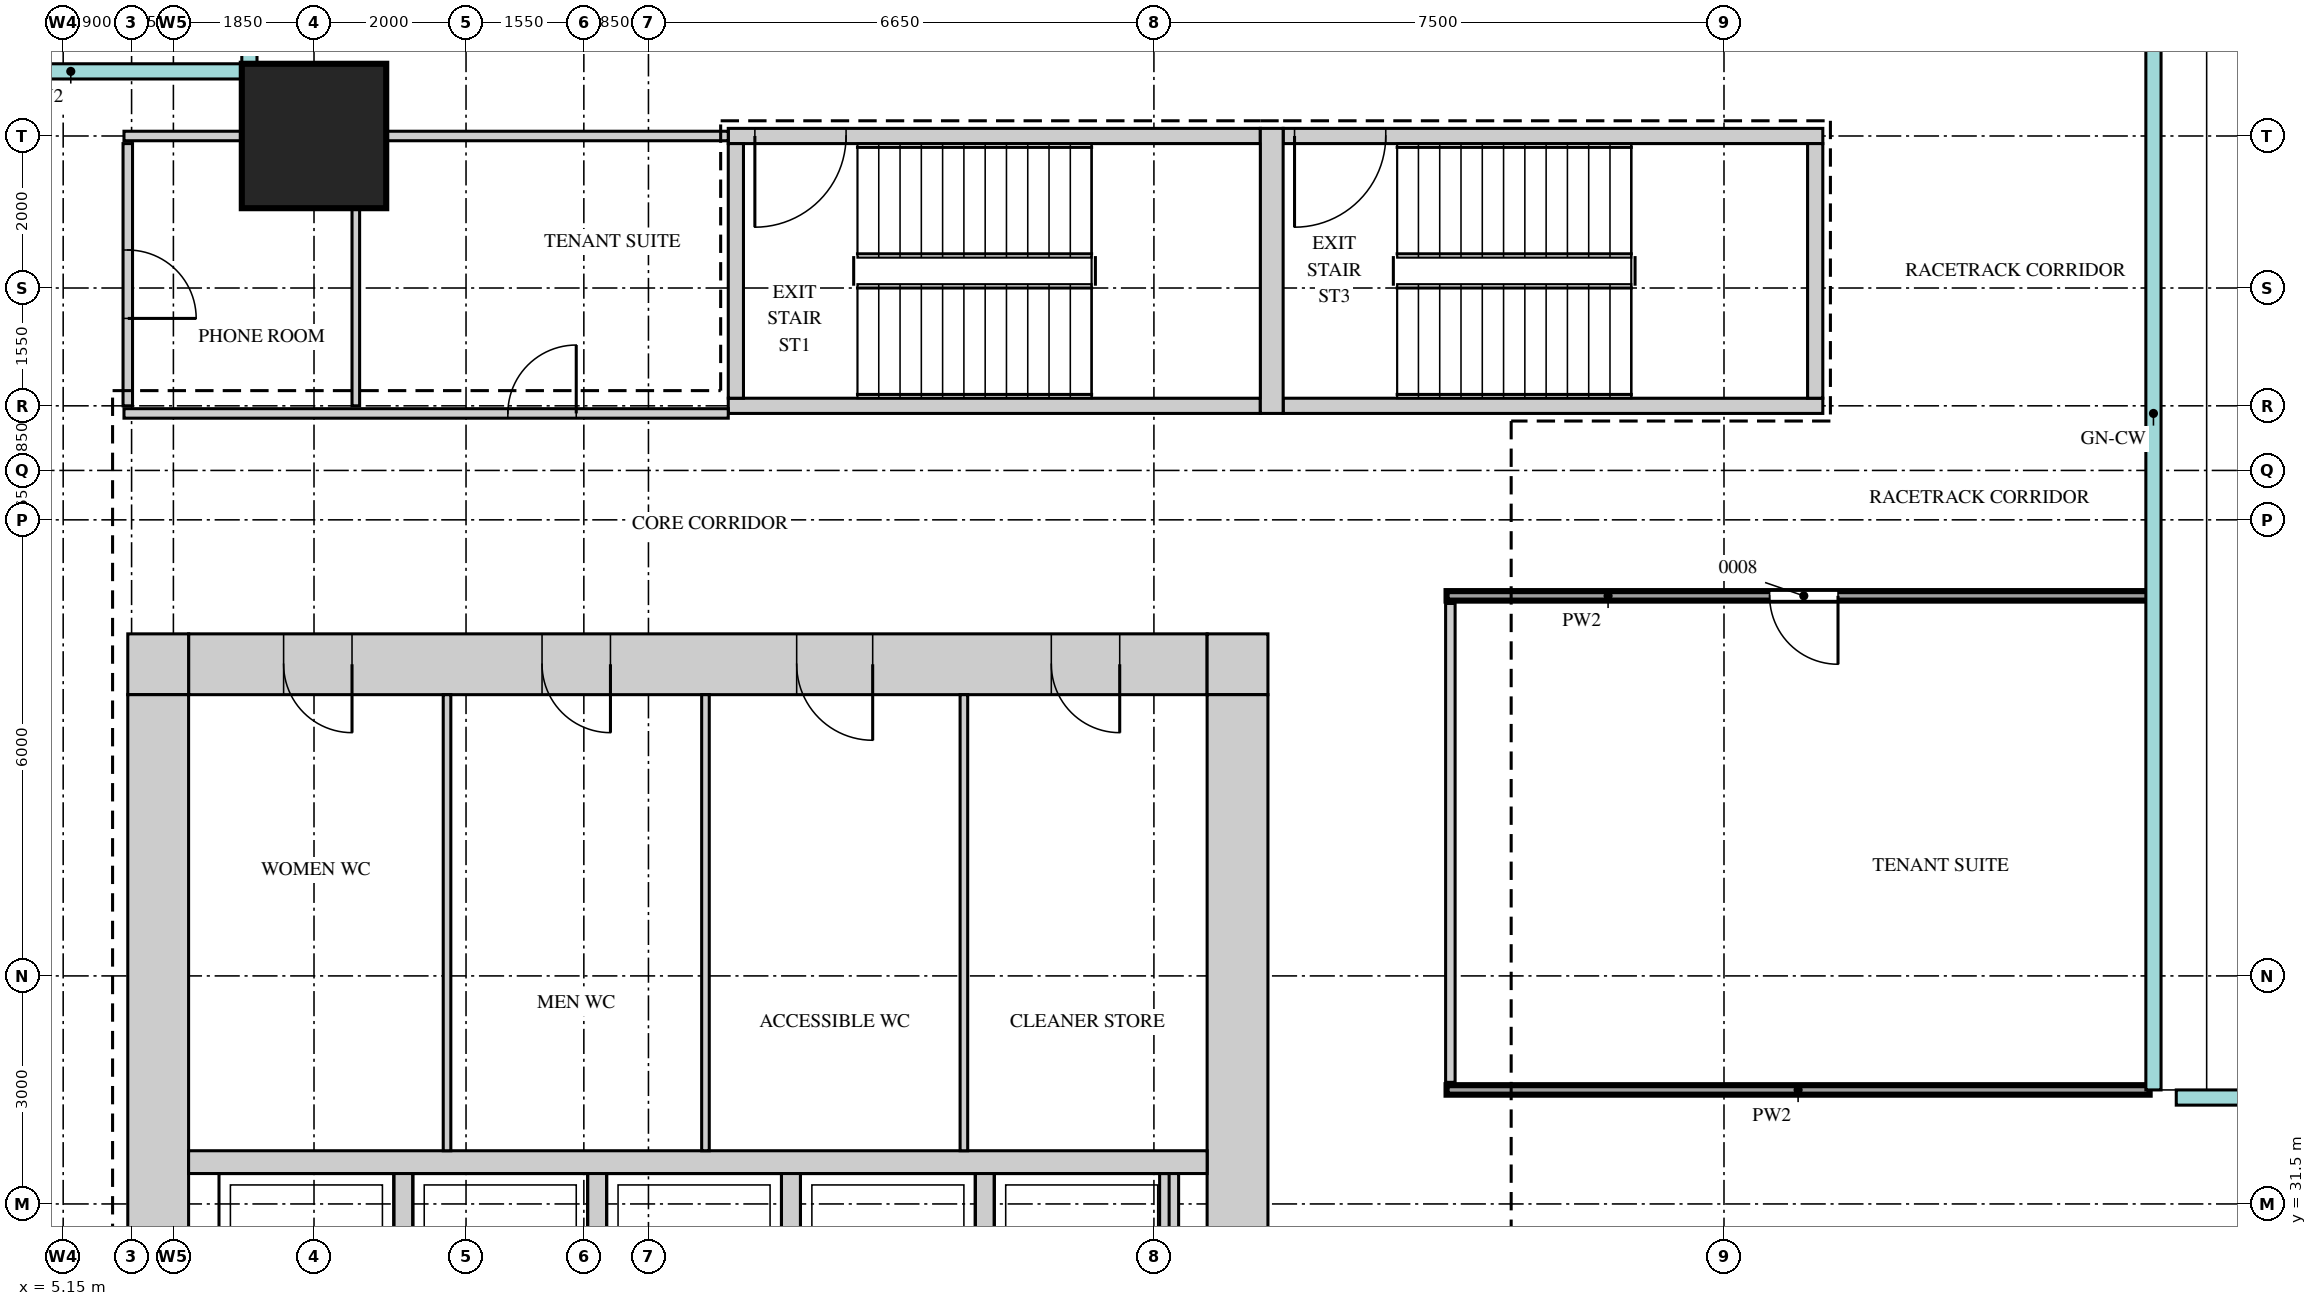
"""IFC4 building model, lengths in metres.
Left out: names, types, materials, properties, quantities, classifications, styles, units other than length and angle.
Written with IfcOpenShell. Run it as: python <this file> out.ifc"""

import sys

from ifc_helpers import new_model, si_unit, direction, frame, frame_2d, origin, origin_2d, place, context, subcontext, project, spatial, rectangle, extrude, source, transform, mapped, element, fill, save


model = new_model("IFC4")
c1 = context("Model", 3, precision=1e-05, world=origin(), true_north=direction((0.0, 1.0)))
c2 = subcontext(c1, "Body", "Model", "MODEL_VIEW")
j1 = project(units=[si_unit("LENGTHUNIT", "METRE"), si_unit("PLANEANGLEUNIT", "RADIAN")], contexts=[c1])
p1 = place(None, origin())
s1 = spatial("IfcSite", under=j1, at=p1, CompositionType="ELEMENT")
p2 = place(p1, origin())
s2 = spatial("IfcBuilding", under=s1, at=p2, CompositionType="ELEMENT")
p3 = place(p2, frame((0.0, 0.0, 176.7)))
s3 = spatial("IfcBuildingStorey", under=s2, at=p3, CompositionType="ELEMENT", Elevation=176.7)
m1 = source(origin(), c2, "Body", "SweptSolid", [
    extrude(rectangle(XDim=13.4, YDim=0.8, at=frame_2d((6.7, 0.0))), origin(), (0.0, 0.0, 1.0), 3.75),
])
p4 = place(p3, frame((6.8, 38.6, 0.0), z_axis=(0.0, 0.0, 1.0), x_axis=(1.0, 0.0, 0.0)))
e1 = element("IfcWall", 1, at=p4, inside=s3, PredefinedType="SHEAR", context=c2, shape_type="MappedRepresentation", body=[
    mapped(m1, transform((0.0, 0.0, 0.0))),
])
m2 = source(origin(), c2, "Body", "SweptSolid", [
    extrude(rectangle(XDim=0.9, YDim=2.1, at=frame_2d((0.45, 1.05))), frame((0.0, 0.41, 0.0), z_axis=(0.0, -1.0, 0.0), x_axis=(1.0, 0.0, 0.0)), (0.0, 0.0, 1.0), 0.82),
])
p5 = place(p4, frame((1.25, 0.0, 0.0)))
e2 = element("IfcOpeningElement", 2, at=p5, cuts=e1, PredefinedType="OPENING", context=c2, shape_type="MappedRepresentation", body=[
    mapped(m2, transform((0.0, 0.0, 0.0))),
])
p6 = place(p4, frame((4.65, 0.0, 0.0)))
e3 = element("IfcOpeningElement", 3, at=p6, cuts=e1, PredefinedType="OPENING", context=c2, shape_type="MappedRepresentation", body=[
    mapped(m2, transform((0.0, 0.0, 0.0))),
])
m3 = source(origin(), c2, "Body", "SweptSolid", [
    extrude(rectangle(XDim=1.0, YDim=2.1, at=frame_2d((0.5, 1.05))), frame((0.0, 0.41, 0.0), z_axis=(0.0, -1.0, 0.0), x_axis=(1.0, 0.0, 0.0)), (0.0, 0.0, 1.0), 0.82),
])
p7 = place(p4, frame((8.0, 0.0, 0.0)))
e4 = element("IfcOpeningElement", 4, at=p7, cuts=e1, PredefinedType="OPENING", context=c2, shape_type="MappedRepresentation", body=[
    mapped(m3, transform((0.0, 0.0, 0.0))),
])
p8 = place(p4, frame((11.35, 0.0, 0.0)))
e5 = element("IfcOpeningElement", 5, at=p8, cuts=e1, PredefinedType="OPENING", context=c2, shape_type="MappedRepresentation", body=[
    mapped(m2, transform((0.0, 0.0, 0.0))),
])
m4 = source(origin(), c2, "Body", "SweptSolid", [
    extrude(rectangle(XDim=0.8, YDim=0.8, at=frame_2d((0.4, 0.0))), origin(), (0.0, 0.0, 1.0), 3.75),
])
for number, where, z_axis, x_axis in (
    (6, (20.2, 38.6, 0.0), (0.0, 0.0, 1.0), (1.0, 0.0, 0.0)),
    (7, (6.0, 38.6, 0.0), (0.0, 0.0, 1.0), (1.0, 0.0, 0.0)),
):
    element("IfcWall", number, at=place(p3, frame(where, z_axis=z_axis, x_axis=x_axis)), inside=s3, PredefinedType="SHEAR", context=c2, shape_type="MappedRepresentation", body=[
        mapped(m4, transform((0.0, 0.0, 0.0))),
    ])
m5 = source(origin(), c2, "Body", "SweptSolid", [
    extrude(rectangle(XDim=22.4, YDim=0.8, at=frame_2d((11.2, 0.0))), origin(), (0.0, 0.0, 1.0), 3.75),
])
p9 = place(p3, frame((20.6, 15.8, 0.0), z_axis=(0.0, 0.0, 1.0), x_axis=(0.0, 1.0, 0.0)))
e8 = element("IfcWall", 8, at=p9, inside=s3, PredefinedType="SHEAR", context=c2, shape_type="MappedRepresentation", body=[
    mapped(m5, transform((0.0, 0.0, 0.0))),
])
m6 = source(origin(), c2, "Body", "SweptSolid", [
    extrude(rectangle(XDim=1.8, YDim=2.1, at=frame_2d((0.9, 1.05))), frame((0.0, 0.41, 0.0), z_axis=(0.0, -1.0, 0.0), x_axis=(1.0, 0.0, 0.0)), (0.0, 0.0, 1.0), 0.82),
])
p10 = place(p9, frame((10.7, 0.0, 0.0)))
e9 = element("IfcOpeningElement", 9, at=p10, cuts=e8, PredefinedType="OPENING", context=c2, shape_type="MappedRepresentation", body=[
    mapped(m6, transform((0.0, 0.0, 0.0))),
])
p11 = place(p9, frame((0.35, 0.0, 0.0)))
e10 = element("IfcOpeningElement", 10, at=p11, cuts=e8, PredefinedType="OPENING", context=c2, shape_type="MappedRepresentation", body=[
    mapped(m2, transform((0.0, 0.0, 0.0))),
])
p12 = place(p9, frame((3.9, 0.0, 0.0)))
e11 = element("IfcOpeningElement", 11, at=p12, cuts=e8, PredefinedType="OPENING", context=c2, shape_type="MappedRepresentation", body=[
    mapped(m2, transform((0.0, 0.0, 0.0))),
])
p13 = place(p3, frame((6.4, 15.8, 0.0), z_axis=(0.0, 0.0, 1.0), x_axis=(0.0, 1.0, 0.0)))
e12 = element("IfcWall", 12, at=p13, inside=s3, PredefinedType="SHEAR", context=c2, shape_type="MappedRepresentation", body=[
    mapped(m5, transform((0.0, 0.0, 0.0))),
])
m7 = source(origin(), c2, "Body", "SweptSolid", [
    extrude(rectangle(XDim=7.0, YDim=0.2, at=frame_2d((3.5, 0.0))), origin(), (0.0, 0.0, 1.0), 3.75),
])
p14 = place(p3, frame((13.9, 45.55, 0.0), z_axis=(0.0, 0.0, 1.0), x_axis=(1.0, 0.0, 0.0)))
e13 = element("IfcWall", 13, at=p14, inside=s3, PredefinedType="SHEAR", context=c2, shape_type="MappedRepresentation", body=[
    mapped(m7, transform((0.0, 0.0, 0.0))),
])
m8 = source(origin(), c2, "Body", "SweptSolid", [
    extrude(rectangle(XDim=1.2, YDim=2.1, at=frame_2d((0.6, 1.05))), frame((0.0, 0.11, 0.0), z_axis=(0.0, -1.0, 0.0), x_axis=(1.0, 0.0, 0.0)), (0.0, 0.0, 1.0), 0.22),
])
p15 = place(p14, frame((0.35, 0.0, 0.0)))
e14 = element("IfcOpeningElement", 14, at=p15, cuts=e13, PredefinedType="OPENING", context=c2, shape_type="MappedRepresentation", body=[
    mapped(m8, transform((0.0, 0.0, 0.0))),
])
p16 = place(p3, frame((13.9, 42.0, 0.0), z_axis=(0.0, 0.0, 1.0), x_axis=(1.0, 0.0, 0.0)))
e15 = element("IfcWall", 15, at=p16, inside=s3, PredefinedType="SHEAR", context=c2, shape_type="MappedRepresentation", body=[
    mapped(m7, transform((0.0, 0.0, 0.0))),
])
m9 = source(origin(), c2, "Body", "SweptSolid", [
    extrude(rectangle(XDim=7.1, YDim=0.2, at=frame_2d((3.55, 0.0))), origin(), (0.0, 0.0, 1.0), 3.75),
])
p17 = place(p3, frame((21.2, 45.55, 0.0), z_axis=(0.0, 0.0, 1.0), x_axis=(1.0, 0.0, 0.0)))
e16 = element("IfcWall", 16, at=p17, inside=s3, PredefinedType="SHEAR", context=c2, shape_type="MappedRepresentation", body=[
    mapped(m9, transform((0.0, 0.0, 0.0))),
])
p18 = place(p17, frame((0.15, 0.0, 0.0)))
e17 = element("IfcOpeningElement", 17, at=p18, cuts=e16, PredefinedType="OPENING", context=c2, shape_type="MappedRepresentation", body=[
    mapped(m8, transform((0.0, 0.0, 0.0))),
])
p19 = place(p3, frame((21.2, 42.0, 0.0), z_axis=(0.0, 0.0, 1.0), x_axis=(1.0, 0.0, 0.0)))
e18 = element("IfcWall", 18, at=p19, inside=s3, PredefinedType="SHEAR", context=c2, shape_type="MappedRepresentation", body=[
    mapped(m9, transform((0.0, 0.0, 0.0))),
])
m10 = source(origin(), c2, "Body", "SweptSolid", [
    extrude(rectangle(XDim=3.75, YDim=0.3, at=frame_2d((1.875, 0.0))), origin(), (0.0, 0.0, 1.0), 3.75),
])
p20 = place(p3, frame((21.05, 41.9, 0.0), z_axis=(0.0, 0.0, 1.0), x_axis=(0.0, 1.0, 0.0)))
e19 = element("IfcWall", 19, at=p20, inside=s3, PredefinedType="SHEAR", context=c2, shape_type="MappedRepresentation", body=[
    mapped(m10, transform((0.0, 0.0, 0.0))),
])
m11 = source(origin(), c2, "Body", "SweptSolid", [
    extrude(rectangle(XDim=3.35, YDim=0.2, at=frame_2d((1.675, 0.0))), origin(), (0.0, 0.0, 1.0), 3.75),
])
for number, where, z_axis, x_axis in (
    (20, (14.0, 42.1, 0.0), (0.0, 0.0, 1.0), (0.0, 1.0, 0.0)),
    (21, (28.2, 42.1, 0.0), (0.0, 0.0, 1.0), (0.0, 1.0, 0.0)),
):
    element("IfcWall", number, at=place(p3, frame(where, z_axis=z_axis, x_axis=x_axis)), inside=s3, PredefinedType="SHEAR", context=c2, shape_type="MappedRepresentation", body=[
        mapped(m11, transform((0.0, 0.0, 0.0))),
    ])
m12 = source(origin(), c2, "Body", "SweptSolid", [
    extrude(rectangle(XDim=13.4, YDim=0.3, at=frame_2d((6.7, 0.0))), origin(), (0.0, 0.0, 1.0), 3.75),
])
p21 = place(p3, frame((6.8, 32.05, 0.0), z_axis=(0.0, 0.0, 1.0), x_axis=(1.0, 0.0, 0.0)))
e22 = element("IfcWall", 22, at=p21, inside=s3, PredefinedType="STANDARD", context=c2, shape_type="MappedRepresentation", body=[
    mapped(m12, transform((0.0, 0.0, 0.0))),
])
m13 = source(origin(), c2, "Body", "SweptSolid", [
    extrude(rectangle(XDim=2.4, YDim=0.25, at=frame_2d((1.2, 0.0))), origin(), (0.0, 0.0, 1.0), 3.75),
])
for number, where, z_axis, x_axis in (
    (23, (17.275, 29.5, 0.0), (0.0, 0.0, 1.0), (0.0, 1.0, 0.0)),
    (24, (19.7, 29.5, 0.0), (0.0, 0.0, 1.0), (0.0, 1.0, 0.0)),
    (25, (9.625, 29.5, 0.0), (0.0, 0.0, 1.0), (0.0, 1.0, 0.0)),
    (26, (12.175, 29.5, 0.0), (0.0, 0.0, 1.0), (0.0, 1.0, 0.0)),
    (27, (14.725, 29.5, 0.0), (0.0, 0.0, 1.0), (0.0, 1.0, 0.0)),
):
    element("IfcWall", number, at=place(p3, frame(where, z_axis=z_axis, x_axis=x_axis)), inside=s3, PredefinedType="STANDARD", context=c2, shape_type="MappedRepresentation", body=[
        mapped(m13, transform((0.0, 0.0, 0.0))),
    ])
m14 = source(origin(), c2, "Body", "SweptSolid", [
    extrude(rectangle(XDim=1.9, YDim=1.9, at=origin_2d()), origin(), (0.0, 0.0, 1.0), 4.0),
])
p22 = place(p3, frame((8.45, 45.55, 0.0), z_axis=(0.0, 0.0, 1.0), x_axis=(1.0, 0.0, 0.0)))
e28 = element("IfcColumn", 28, at=p22, inside=s3, PredefinedType="COLUMN", context=c2, shape_type="MappedRepresentation", body=[
    mapped(m14, transform((0.0, 0.0, 0.0))),
])
m15 = source(origin(), c2, "Body", "SweptSolid", [
    extrude(rectangle(XDim=6.0, YDim=0.1, at=frame_2d((3.0, 0.0))), origin(), (0.0, 0.0, 1.0), 3.8),
])
for number, where, z_axis, x_axis in (
    (29, (10.2, 32.2, 0.0), (0.0, 0.0, 1.0), (0.0, 1.0, 0.0)),
    (30, (13.6, 32.2, 0.0), (0.0, 0.0, 1.0), (0.0, 1.0, 0.0)),
    (31, (17.0, 32.2, 0.0), (0.0, 0.0, 1.0), (0.0, 1.0, 0.0)),
):
    element("IfcWall", number, at=place(p3, frame(where, z_axis=z_axis, x_axis=x_axis)), inside=s3, PredefinedType="PARTITIONING", context=c2, shape_type="MappedRepresentation", body=[
        mapped(m15, transform((0.0, 0.0, 0.0))),
    ])
m16 = source(origin(), c2, "Body", "SweptSolid", [
    extrude(rectangle(XDim=9.25, YDim=0.125, at=frame_2d((4.625, 0.0))), origin(), (0.0, 0.0, 1.0), 3.8),
])
p23 = place(p3, frame((23.35, 33.0, 0.0), z_axis=(0.0, 0.0, 1.0), x_axis=(1.0, 0.0, 0.0)))
e32 = element("IfcWall", 32, at=p23, inside=s3, PredefinedType="PARTITIONING", context=c2, shape_type="MappedRepresentation", body=[
    mapped(m16, transform((0.0, 0.0, 0.0))),
])
m17 = source(origin(), c2, "Body", "SweptSolid", [
    extrude(rectangle(XDim=6.3, YDim=0.125, at=frame_2d((3.15, 0.0))), origin(), (0.0, 0.0, 1.0), 3.8),
])
p24 = place(p3, frame((23.4, 33.1, 0.0), z_axis=(0.0, 0.0, 1.0), x_axis=(0.0, 1.0, 0.0)))
e33 = element("IfcWall", 33, at=p24, inside=s3, PredefinedType="PARTITIONING", context=c2, shape_type="MappedRepresentation", body=[
    mapped(m17, transform((0.0, 0.0, 0.0))),
])
p25 = place(p3, frame((23.35, 39.5, 0.0), z_axis=(0.0, 0.0, 1.0), x_axis=(1.0, 0.0, 0.0)))
e34 = element("IfcWall", 34, at=p25, inside=s3, PredefinedType="PARTITIONING", context=c2, shape_type="MappedRepresentation", body=[
    mapped(m16, transform((0.0, 0.0, 0.0))),
])
m18 = source(origin(), c2, "Body", "SweptSolid", [
    extrude(rectangle(XDim=0.9, YDim=2.1, at=frame_2d((0.45, 1.05))), frame((0.0, 0.073, 0.0), z_axis=(0.0, -1.0, 0.0), x_axis=(1.0, 0.0, 0.0)), (0.0, 0.0, 1.0), 0.145),
])
p26 = place(p25, frame((4.25, 0.0, 0.0)))
e35 = element("IfcOpeningElement", 35, at=p26, cuts=e34, PredefinedType="OPENING", context=c2, shape_type="MappedRepresentation", body=[
    mapped(m18, transform((0.0, 0.0, 0.0))),
])
m19 = source(origin(), c2, "Body", "SweptSolid", [
    extrude(rectangle(XDim=7.95, YDim=0.125, at=frame_2d((3.975, 0.0))), origin(), (0.0, 0.0, 1.0), 3.8),
])
p27 = place(p3, frame((5.95, 41.9, 0.0), z_axis=(0.0, 0.0, 1.0), x_axis=(1.0, 0.0, 0.0)))
e36 = element("IfcWall", 36, at=p27, inside=s3, PredefinedType="PARTITIONING", context=c2, shape_type="MappedRepresentation", body=[
    mapped(m19, transform((0.0, 0.0, 0.0))),
])
p28 = place(p27, frame((5.05, 0.0, 0.0)))
e37 = element("IfcOpeningElement", 37, at=p28, cuts=e36, PredefinedType="OPENING", context=c2, shape_type="MappedRepresentation", body=[
    mapped(m18, transform((0.0, 0.0, 0.0))),
])
m20 = source(origin(), c2, "Body", "SweptSolid", [
    extrude(rectangle(XDim=3.45, YDim=0.125, at=frame_2d((1.725, 0.0))), origin(), (0.0, 0.0, 1.0), 3.8),
])
p29 = place(p3, frame((6.0, 42.0, 0.0), z_axis=(0.0, 0.0, 1.0), x_axis=(0.0, 1.0, 0.0)))
e38 = element("IfcWall", 38, at=p29, inside=s3, PredefinedType="PARTITIONING", context=c2, shape_type="MappedRepresentation", body=[
    mapped(m20, transform((0.0, 0.0, 0.0))),
])
p30 = place(p29, frame((1.15, 0.0, 0.0)))
e39 = element("IfcOpeningElement", 39, at=p30, cuts=e38, PredefinedType="OPENING", context=c2, shape_type="MappedRepresentation", body=[
    mapped(m18, transform((0.0, 0.0, 0.0))),
])
m21 = source(origin(), c2, "Body", "SweptSolid", [
    extrude(rectangle(XDim=3.45, YDim=0.1, at=frame_2d((1.725, 0.0))), origin(), (0.0, 0.0, 1.0), 3.8),
])
p31 = place(p3, frame((9.0, 42.0, 0.0), z_axis=(0.0, 0.0, 1.0), x_axis=(0.0, 1.0, 0.0)))
e40 = element("IfcWall", 40, at=p31, inside=s3, PredefinedType="PARTITIONING", context=c2, shape_type="MappedRepresentation", body=[
    mapped(m21, transform((0.0, 0.0, 0.0))),
])
m22 = source(origin(), c2, "Body", "SweptSolid", [
    extrude(rectangle(XDim=7.95, YDim=0.125, at=frame_2d((3.975, 0.0))), origin(), (0.0, 0.0, 1.0), 3.25),
])
p32 = place(p3, frame((5.95, 45.55, 0.0), z_axis=(0.0, 0.0, 1.0), x_axis=(1.0, 0.0, 0.0)))
e41 = element("IfcWall", 41, at=p32, inside=s3, PredefinedType="PARTITIONING", context=c2, shape_type="MappedRepresentation", body=[
    mapped(m22, transform((0.0, 0.0, 0.0))),
])
m23 = source(origin(), c2, "Body", "SweptSolid", [
    extrude(rectangle(XDim=0.9, YDim=2.1, at=frame_2d((0.45, 1.05))), frame((0.0, 0.35, 0.0), z_axis=(0.0, -1.0, 0.0), x_axis=(1.0, 0.0, 0.0)), (0.0, 0.0, 1.0), 0.7),
])
p33 = place(p5, origin())
e42 = element("IfcDoor", 42, at=p33, inside=s3, OperationType="SINGLE_SWING_RIGHT", PredefinedType="DOOR", context=c2, shape_type="MappedRepresentation", body=[
    mapped(m23, transform((0.0, 0.0, 0.0))),
])
fill(e2, e42)
p34 = place(p6, origin())
e43 = element("IfcDoor", 43, at=p34, inside=s3, OperationType="SINGLE_SWING_RIGHT", PredefinedType="DOOR", context=c2, shape_type="MappedRepresentation", body=[
    mapped(m23, transform((0.0, 0.0, 0.0))),
])
fill(e3, e43)
m24 = source(origin(), c2, "Body", "SweptSolid", [
    extrude(rectangle(XDim=1.0, YDim=2.1, at=frame_2d((0.5, 1.05))), frame((0.0, 0.35, 0.0), z_axis=(0.0, -1.0, 0.0), x_axis=(1.0, 0.0, 0.0)), (0.0, 0.0, 1.0), 0.7),
])
p35 = place(p7, origin())
e44 = element("IfcDoor", 44, at=p35, inside=s3, OperationType="SINGLE_SWING_RIGHT", PredefinedType="DOOR", context=c2, shape_type="MappedRepresentation", body=[
    mapped(m24, transform((0.0, 0.0, 0.0))),
])
fill(e4, e44)
p36 = place(p8, origin())
e45 = element("IfcDoor", 45, at=p36, inside=s3, OperationType="SINGLE_SWING_RIGHT", PredefinedType="DOOR", context=c2, shape_type="MappedRepresentation", body=[
    mapped(m23, transform((0.0, 0.0, 0.0))),
])
fill(e5, e45)
m25 = source(origin(), c2, "Body", "SweptSolid", [
    extrude(rectangle(XDim=0.9, YDim=2.1, at=frame_2d((0.45, 1.05))), frame((0.0, 0.025, 0.0), z_axis=(0.0, -1.0, 0.0), x_axis=(1.0, 0.0, 0.0)), (0.0, 0.0, 1.0), 0.05),
])
p37 = place(p26, origin())
e46 = element("IfcDoor", 46, at=p37, inside=s3, OperationType="SINGLE_SWING_RIGHT", PredefinedType="DOOR", context=c2, shape_type="MappedRepresentation", body=[
    mapped(m25, transform((0.0, 0.0, 0.0))),
])
fill(e35, e46)
p38 = place(p30, origin())
e47 = element("IfcDoor", 47, at=p38, inside=s3, OperationType="SINGLE_SWING_LEFT", PredefinedType="DOOR", context=c2, shape_type="MappedRepresentation", body=[
    mapped(m25, transform((0.0, 0.0, 0.0))),
])
fill(e39, e47)
p39 = place(p28, origin())
e48 = element("IfcDoor", 48, at=p39, inside=s3, OperationType="SINGLE_SWING_LEFT", PredefinedType="DOOR", context=c2, shape_type="MappedRepresentation", body=[
    mapped(m25, transform((0.0, 0.0, 0.0))),
])
fill(e37, e48)
m26 = source(origin(), c2, "Body", "SweptSolid", [
    extrude(rectangle(XDim=1.2, YDim=2.1, at=frame_2d((0.6, 1.05))), frame((0.0, 0.025, 0.0), z_axis=(0.0, -1.0, 0.0), x_axis=(1.0, 0.0, 0.0)), (0.0, 0.0, 1.0), 0.05),
])
p40 = place(p15, origin())
e49 = element("IfcDoor", 49, at=p40, inside=s3, OperationType="SINGLE_SWING_LEFT", PredefinedType="DOOR", context=c2, shape_type="MappedRepresentation", body=[
    mapped(m26, transform((0.0, 0.0, 0.0))),
])
fill(e14, e49)
p41 = place(p18, origin())
e50 = element("IfcDoor", 50, at=p41, inside=s3, OperationType="SINGLE_SWING_LEFT", PredefinedType="DOOR", context=c2, shape_type="MappedRepresentation", body=[
    mapped(m26, transform((0.0, 0.0, 0.0))),
])
fill(e17, e50)
save(model, sys.argv[1])
